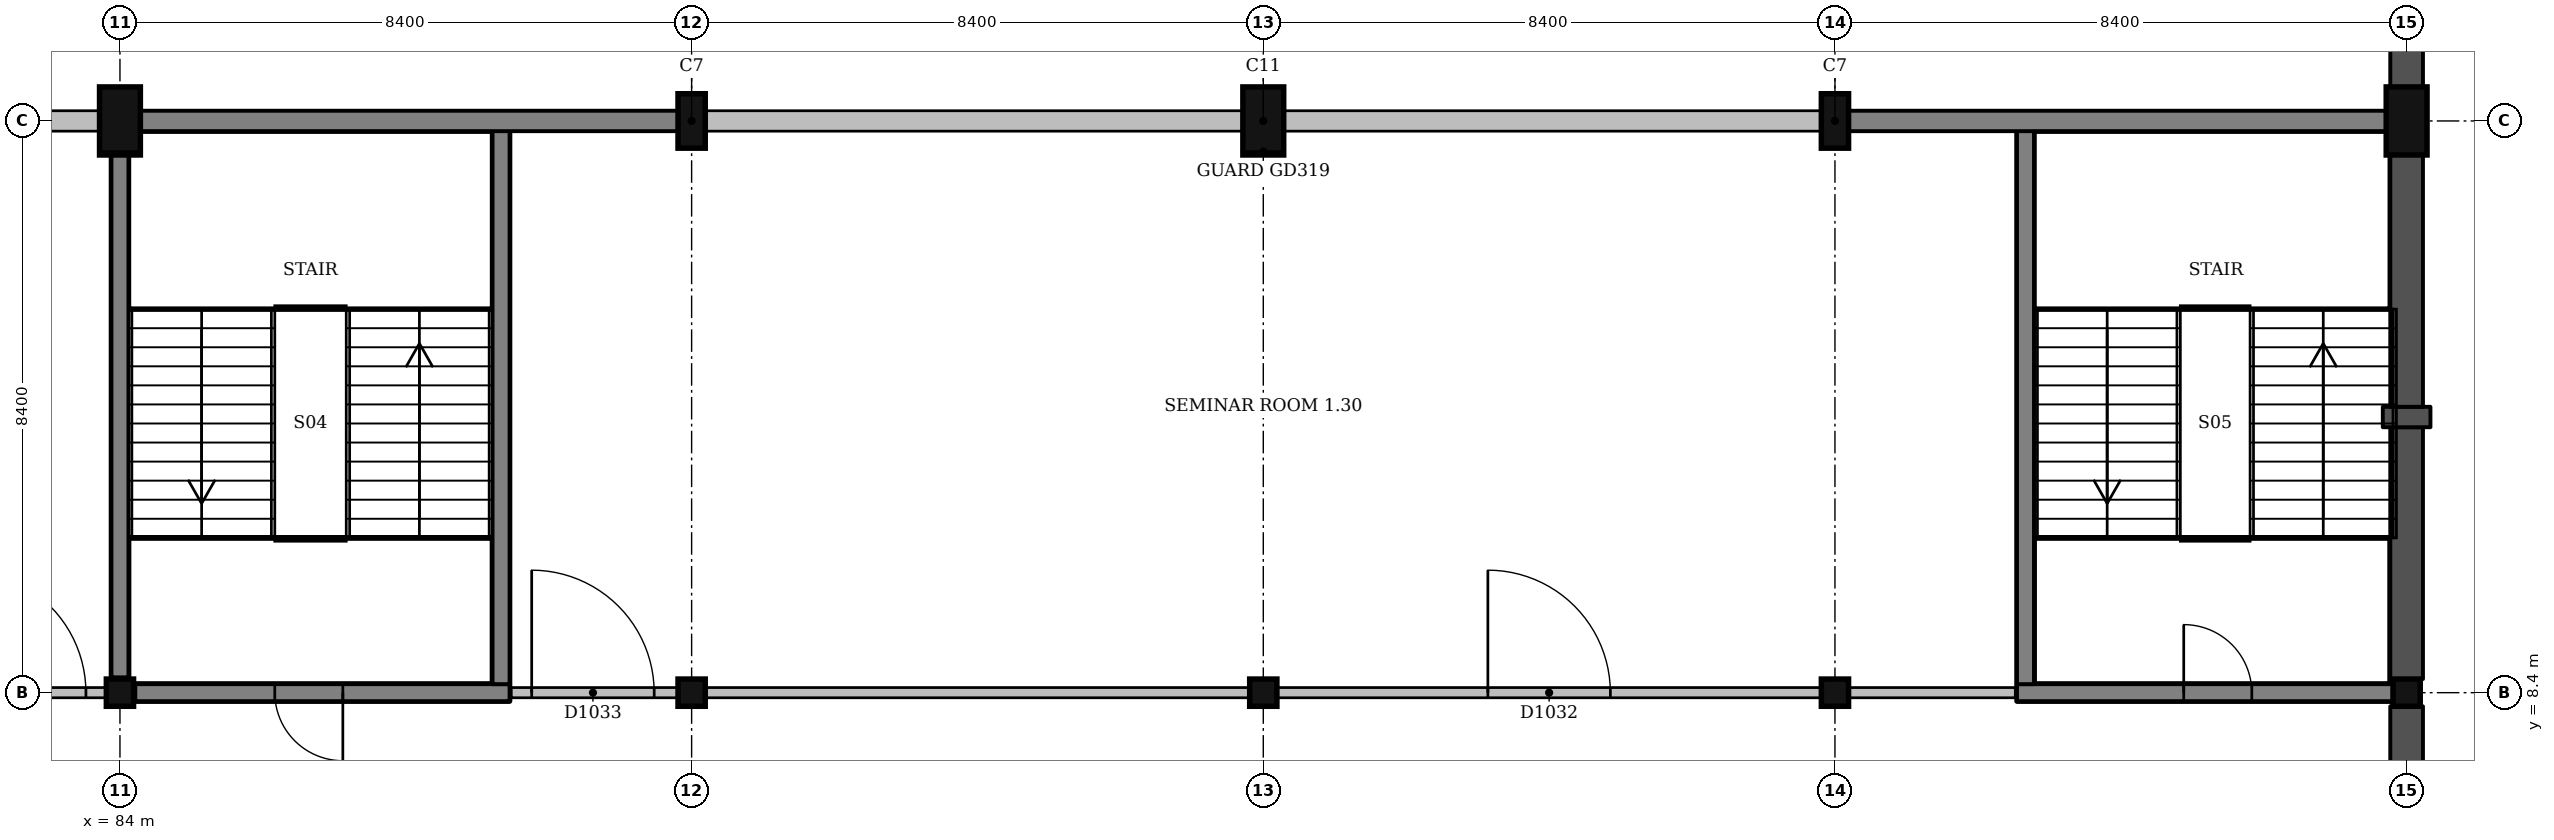
"""IFC4 building model, lengths in metres.
Left out: names, types, materials, properties, quantities, classifications, styles, units other than length and angle.
Written with IfcOpenShell. Run it as: python <this file> out.ifc"""

import sys

from ifc_helpers import new_model, si_unit, direction, frame, frame_2d, origin, origin_2d, place, context, subcontext, project, spatial, rectangle, extrude, element, fill, save


model = new_model("IFC4")
c1 = context("Model", 3, precision=1e-05, world=origin(), true_north=direction((0.0, 1.0)))
c2 = subcontext(c1, "Body", "Model", "MODEL_VIEW")
j1 = project(units=[si_unit("LENGTHUNIT", "METRE"), si_unit("PLANEANGLEUNIT", "RADIAN")], contexts=[c1])
p1 = place(None, origin())
s1 = spatial("IfcSite", under=j1, at=p1, CompositionType="ELEMENT")
p2 = place(p1, origin())
s2 = spatial("IfcBuilding", under=s1, at=p2, CompositionType="ELEMENT")
p3 = place(p2, frame((0.0, 0.0, 4.5)))
s3 = spatial("IfcBuildingStorey", under=s2, at=p3, CompositionType="ELEMENT", Elevation=4.5)
p4 = place(p3, frame((84.0, 8.4, 0.0), z_axis=(0.0, 0.0, 1.0), x_axis=(1.0, 0.0, 0.0)))
e1 = element("IfcColumn", 1, at=p4, inside=s3, PredefinedType="COLUMN", context=c2, shape_type="SweptSolid", body=[
    extrude(rectangle(XDim=0.4, YDim=0.4, at=origin_2d()), origin(), (0.0, 0.0, 1.0), 4.5),
])
p5 = place(p3, frame((84.0, 16.8, 0.0), z_axis=(0.0, 0.0, 1.0), x_axis=(1.0, 0.0, 0.0)))
e2 = element("IfcColumn", 2, at=p5, inside=s3, PredefinedType="COLUMN", context=c2, shape_type="SweptSolid", body=[
    extrude(rectangle(XDim=0.6, YDim=1.0, at=origin_2d()), origin(), (0.0, 0.0, 1.0), 4.5),
])
p6 = place(p3, frame((92.4, 8.4, 0.0), z_axis=(0.0, 0.0, 1.0), x_axis=(1.0, 0.0, 0.0)))
e3 = element("IfcColumn", 3, at=p6, inside=s3, PredefinedType="COLUMN", context=c2, shape_type="SweptSolid", body=[
    extrude(rectangle(XDim=0.4, YDim=0.4, at=origin_2d()), origin(), (0.0, 0.0, 1.0), 4.5),
])
p7 = place(p3, frame((92.4, 16.8, 0.0), z_axis=(0.0, 0.0, 1.0), x_axis=(1.0, 0.0, 0.0)))
e4 = element("IfcColumn", 4, at=p7, inside=s3, PredefinedType="COLUMN", context=c2, shape_type="SweptSolid", body=[
    extrude(rectangle(XDim=0.4, YDim=0.8, at=origin_2d()), origin(), (0.0, 0.0, 1.0), 4.5),
])
p8 = place(p3, frame((100.8, 8.4, 0.0), z_axis=(0.0, 0.0, 1.0), x_axis=(1.0, 0.0, 0.0)))
e5 = element("IfcColumn", 5, at=p8, inside=s3, PredefinedType="COLUMN", context=c2, shape_type="SweptSolid", body=[
    extrude(rectangle(XDim=0.4, YDim=0.4, at=origin_2d()), origin(), (0.0, 0.0, 1.0), 4.5),
])
p9 = place(p3, frame((100.8, 16.8, 0.0), z_axis=(0.0, 0.0, 1.0), x_axis=(1.0, 0.0, 0.0)))
e6 = element("IfcColumn", 6, at=p9, inside=s3, PredefinedType="COLUMN", context=c2, shape_type="SweptSolid", body=[
    extrude(rectangle(XDim=0.6, YDim=1.0, at=origin_2d()), origin(), (0.0, 0.0, 1.0), 4.5),
])
p10 = place(p3, frame((109.2, 8.4, 0.0), z_axis=(0.0, 0.0, 1.0), x_axis=(1.0, 0.0, 0.0)))
e7 = element("IfcColumn", 7, at=p10, inside=s3, PredefinedType="COLUMN", context=c2, shape_type="SweptSolid", body=[
    extrude(rectangle(XDim=0.4, YDim=0.4, at=origin_2d()), origin(), (0.0, 0.0, 1.0), 4.5),
])
p11 = place(p3, frame((109.2, 16.8, 0.0), z_axis=(0.0, 0.0, 1.0), x_axis=(1.0, 0.0, 0.0)))
e8 = element("IfcColumn", 8, at=p11, inside=s3, PredefinedType="COLUMN", context=c2, shape_type="SweptSolid", body=[
    extrude(rectangle(XDim=0.4, YDim=0.8, at=origin_2d()), origin(), (0.0, 0.0, 1.0), 4.5),
])
p12 = place(p3, frame((117.6, 8.4, 0.0), z_axis=(0.0, 0.0, 1.0), x_axis=(1.0, 0.0, 0.0)))
e9 = element("IfcColumn", 9, at=p12, inside=s3, PredefinedType="COLUMN", context=c2, shape_type="SweptSolid", body=[
    extrude(rectangle(XDim=0.4, YDim=0.4, at=origin_2d()), origin(), (0.0, 0.0, 1.0), 4.5),
])
p13 = place(p3, frame((117.6, 16.8, 0.0), z_axis=(0.0, 0.0, 1.0), x_axis=(1.0, 0.0, 0.0)))
e10 = element("IfcColumn", 10, at=p13, inside=s3, PredefinedType="COLUMN", context=c2, shape_type="SweptSolid", body=[
    extrude(rectangle(XDim=0.6, YDim=1.0, at=origin_2d()), origin(), (0.0, 0.0, 1.0), 4.5),
])
p14 = place(p3, frame((111.875, 8.4, 0.0), z_axis=(0.0, 0.0, 1.0), x_axis=(1.0, 0.0, 0.0)))
e11 = element("IfcWall", 11, at=p14, inside=s3, PredefinedType="SHEAR", context=c2, shape_type="SweptSolid", body=[
    extrude(rectangle(XDim=5.525, YDim=0.25, at=frame_2d((2.762, 0.0))), origin(), (0.0, 0.0, 1.0), 4.5),
])
p15 = place(p14, frame((2.45, 0.0, 0.0)))
e12 = element("IfcOpeningElement", 12, at=p15, cuts=e11, PredefinedType="OPENING", context=c2, shape_type="SweptSolid", body=[
    extrude(rectangle(XDim=1.0, YDim=2.1, at=frame_2d((0.5, 1.05))), frame((0.0, 0.135, 0.0), z_axis=(0.0, -1.0, 0.0), x_axis=(1.0, 0.0, 0.0)), (0.0, 0.0, 1.0), 0.27),
])
p16 = place(p3, frame((112.0, 8.525, 0.0), z_axis=(0.0, 0.0, 1.0), x_axis=(0.0, 1.0, 0.0)))
e13 = element("IfcWall", 13, at=p16, inside=s3, PredefinedType="SHEAR", context=c2, shape_type="SweptSolid", body=[
    extrude(rectangle(XDim=8.15, YDim=0.25, at=frame_2d((4.075, 0.0))), origin(), (0.0, 0.0, 1.0), 4.5),
])
p17 = place(p3, frame((84.225, 8.4, 0.0), z_axis=(0.0, 0.0, 1.0), x_axis=(1.0, 0.0, 0.0)))
e14 = element("IfcWall", 14, at=p17, inside=s3, PredefinedType="SHEAR", context=c2, shape_type="SweptSolid", body=[
    extrude(rectangle(XDim=5.5, YDim=0.25, at=frame_2d((2.75, 0.0))), origin(), (0.0, 0.0, 1.0), 4.5),
])
p18 = place(p17, frame((2.05, 0.0, 0.0)))
e15 = element("IfcOpeningElement", 15, at=p18, cuts=e14, PredefinedType="OPENING", context=c2, shape_type="SweptSolid", body=[
    extrude(rectangle(XDim=1.0, YDim=2.1, at=frame_2d((0.5, 1.05))), frame((0.0, 0.135, 0.0), z_axis=(0.0, -1.0, 0.0), x_axis=(1.0, 0.0, 0.0)), (0.0, 0.0, 1.0), 0.27),
])
p19 = place(p3, frame((84.0, 8.625, 0.0), z_axis=(0.0, 0.0, 1.0), x_axis=(0.0, 1.0, 0.0)))
e16 = element("IfcWall", 16, at=p19, inside=s3, PredefinedType="SHEAR", context=c2, shape_type="SweptSolid", body=[
    extrude(rectangle(XDim=7.675, YDim=0.25, at=frame_2d((3.837, 0.0))), origin(), (0.0, 0.0, 1.0), 4.5),
])
p20 = place(p3, frame((89.6, 8.525, 0.0), z_axis=(0.0, 0.0, 1.0), x_axis=(0.0, 1.0, 0.0)))
e17 = element("IfcWall", 17, at=p20, inside=s3, PredefinedType="SHEAR", context=c2, shape_type="SweptSolid", body=[
    extrude(rectangle(XDim=8.15, YDim=0.25, at=frame_2d((4.075, 0.0))), origin(), (0.0, 0.0, 1.0), 4.5),
])
p21 = place(p3, frame((117.6, 4.35, 0.0), z_axis=(0.0, 0.0, 1.0), x_axis=(0.0, 1.0, 0.0)))
e18 = element("IfcWall", 18, at=p21, inside=s3, PredefinedType="SOLIDWALL", context=c2, shape_type="SweptSolid", body=[
    extrude(rectangle(XDim=3.85, YDim=0.48, at=frame_2d((1.925, 0.0))), origin(), (0.0, 0.0, 1.0), 3.45),
])
p22 = place(p3, frame((117.6, 8.6, 0.0), z_axis=(0.0, 0.0, 1.0), x_axis=(0.0, 1.0, 0.0)))
e19 = element("IfcWall", 19, at=p22, inside=s3, PredefinedType="SOLIDWALL", context=c2, shape_type="SweptSolid", body=[
    extrude(rectangle(XDim=3.7, YDim=0.48, at=frame_2d((1.85, 0.0))), origin(), (0.0, 0.0, 1.0), 3.75),
])
p23 = place(p3, frame((117.6, 12.3, 0.0), z_axis=(0.0, 0.0, 1.0), x_axis=(0.0, 1.0, 0.0)))
e20 = element("IfcWall", 20, at=p23, inside=s3, PredefinedType="SOLIDWALL", context=c2, shape_type="SweptSolid", body=[
    extrude(rectangle(XDim=0.3, YDim=0.7, at=frame_2d((0.15, 0.0))), origin(), (0.0, 0.0, 1.0), 3.75),
])
p24 = place(p3, frame((117.6, 12.6, 0.0), z_axis=(0.0, 0.0, 1.0), x_axis=(0.0, 1.0, 0.0)))
e21 = element("IfcWall", 21, at=p24, inside=s3, PredefinedType="SOLIDWALL", context=c2, shape_type="SweptSolid", body=[
    extrude(rectangle(XDim=3.7, YDim=0.48, at=frame_2d((1.85, 0.0))), origin(), (0.0, 0.0, 1.0), 3.75),
])
p25 = place(p3, frame((117.3, 16.8, 0.0), z_axis=(0.0, 0.0, 1.0), x_axis=(-1.0, 0.0, 0.0)))
e22 = element("IfcWall", 22, at=p25, inside=s3, PredefinedType="SOLIDWALL", context=c2, shape_type="SweptSolid", body=[
    extrude(rectangle(XDim=7.9, YDim=0.3, at=frame_2d((3.95, 0.0))), origin(), (0.0, 0.0, 1.0), 3.45),
])
for number, where, z_axis, x_axis in (
    (23, (109.0, 16.8, 0.0), (0.0, 0.0, 1.0), (-1.0, 0.0, 0.0)),
    (24, (100.5, 16.8, 0.0), (0.0, 0.0, 1.0), (-1.0, 0.0, 0.0)),
    (25, (92.2, 16.8, 0.0), (0.0, 0.0, 1.0), (-1.0, 0.0, 0.0)),
    (26, (83.7, 16.8, 0.0), (0.0, 0.0, 1.0), (-1.0, 0.0, 0.0)),
):
    element("IfcWall", number, at=place(p3, frame(where, z_axis=z_axis, x_axis=x_axis)), inside=s3, PredefinedType="SOLIDWALL", context=c2, shape_type="SweptSolid", body=[
        extrude(rectangle(XDim=7.9, YDim=0.3, at=frame_2d((3.95, 0.0))), origin(), (0.0, 0.0, 1.0), 3.45),
    ])
p26 = place(p3, frame((117.6, 17.3, 0.0), z_axis=(0.0, 0.0, 1.0), x_axis=(0.0, 1.0, 0.0)))
e27 = element("IfcWall", 27, at=p26, inside=s3, PredefinedType="SOLIDWALL", context=c2, shape_type="SweptSolid", body=[
    extrude(rectangle(XDim=3.675, YDim=0.48, at=frame_2d((1.837, 0.0))), origin(), (0.0, 0.0, 1.0), 2.489),
])
p27 = place(p3, frame((89.75, 8.4, 0.0), z_axis=(0.0, 0.0, 1.0), x_axis=(1.0, 0.0, 0.0)))
e28 = element("IfcWall", 28, at=p27, inside=s3, PredefinedType="PARTITIONING", context=c2, shape_type="SweptSolid", body=[
    extrude(rectangle(XDim=2.45, YDim=0.15, at=frame_2d((1.225, 0.0))), origin(), (0.0, 0.0, 1.0), 3.6),
])
p28 = place(p27, frame((0.3, 0.0, 0.0)))
e29 = element("IfcOpeningElement", 29, at=p28, cuts=e28, PredefinedType="OPENING", context=c2, shape_type="SweptSolid", body=[
    extrude(rectangle(XDim=1.8, YDim=2.1, at=frame_2d((0.9, 1.05))), frame((0.0, 0.085, 0.0), z_axis=(0.0, -1.0, 0.0), x_axis=(1.0, 0.0, 0.0)), (0.0, 0.0, 1.0), 0.17),
])
p29 = place(p3, frame((92.6, 8.4, 0.0), z_axis=(0.0, 0.0, 1.0), x_axis=(1.0, 0.0, 0.0)))
e30 = element("IfcWall", 30, at=p29, inside=s3, PredefinedType="PARTITIONING", context=c2, shape_type="SweptSolid", body=[
    extrude(rectangle(XDim=8.0, YDim=0.15, at=frame_2d((4.0, 0.0))), origin(), (0.0, 0.0, 1.0), 3.5),
])
p30 = place(p3, frame((101.0, 8.4, 0.0), z_axis=(0.0, 0.0, 1.0), x_axis=(1.0, 0.0, 0.0)))
e31 = element("IfcWall", 31, at=p30, inside=s3, PredefinedType="PARTITIONING", context=c2, shape_type="SweptSolid", body=[
    extrude(rectangle(XDim=8.0, YDim=0.15, at=frame_2d((4.0, 0.0))), origin(), (0.0, 0.0, 1.0), 3.5),
])
p31 = place(p30, frame((3.1, 0.0, 0.0)))
e32 = element("IfcOpeningElement", 32, at=p31, cuts=e31, PredefinedType="OPENING", context=c2, shape_type="SweptSolid", body=[
    extrude(rectangle(XDim=1.8, YDim=2.1, at=frame_2d((0.9, 1.05))), frame((0.0, 0.085, 0.0), z_axis=(0.0, -1.0, 0.0), x_axis=(1.0, 0.0, 0.0)), (0.0, 0.0, 1.0), 0.17),
])
p32 = place(p3, frame((109.4, 8.4, 0.0), z_axis=(0.0, 0.0, 1.0), x_axis=(1.0, 0.0, 0.0)))
e33 = element("IfcWall", 33, at=p32, inside=s3, PredefinedType="PARTITIONING", context=c2, shape_type="SweptSolid", body=[
    extrude(rectangle(XDim=2.45, YDim=0.15, at=frame_2d((1.225, 0.0))), origin(), (0.0, 0.0, 1.0), 3.6),
])
p33 = place(p3, frame((75.8, 8.4, 0.0), z_axis=(0.0, 0.0, 1.0), x_axis=(1.0, 0.0, 0.0)))
e34 = element("IfcWall", 34, at=p33, inside=s3, PredefinedType="PARTITIONING", context=c2, shape_type="SweptSolid", body=[
    extrude(rectangle(XDim=8.0, YDim=0.15, at=frame_2d((4.0, 0.0))), origin(), (0.0, 0.0, 1.0), 3.5),
])
p34 = place(p33, frame((5.9, 0.0, 0.0)))
e35 = element("IfcOpeningElement", 35, at=p34, cuts=e34, PredefinedType="OPENING", context=c2, shape_type="SweptSolid", body=[
    extrude(rectangle(XDim=1.8, YDim=2.1, at=frame_2d((0.9, 1.05))), frame((0.0, 0.085, 0.0), z_axis=(0.0, -1.0, 0.0), x_axis=(1.0, 0.0, 0.0)), (0.0, 0.0, 1.0), 0.17),
])
p35 = place(p34, origin())
e36 = element("IfcDoor", 36, at=p35, inside=s3, OperationType="DOUBLE_DOOR_SINGLE_SWING", PredefinedType="DOOR", context=c2, shape_type="SweptSolid", body=[
    extrude(rectangle(XDim=1.8, YDim=2.1, at=frame_2d((0.9, 1.05))), frame((0.0, 0.025, 0.0), z_axis=(0.0, -1.0, 0.0), x_axis=(1.0, 0.0, 0.0)), (0.0, 0.0, 1.0), 0.05),
])
fill(e35, e36)
p36 = place(p31, origin())
e37 = element("IfcDoor", 37, at=p36, inside=s3, OperationType="DOUBLE_DOOR_SINGLE_SWING", PredefinedType="DOOR", context=c2, shape_type="SweptSolid", body=[
    extrude(rectangle(XDim=1.8, YDim=2.1, at=frame_2d((0.9, 1.05))), frame((0.0, 0.025, 0.0), z_axis=(0.0, -1.0, 0.0), x_axis=(1.0, 0.0, 0.0)), (0.0, 0.0, 1.0), 0.05),
])
fill(e32, e37)
p37 = place(p28, origin())
e38 = element("IfcDoor", 38, at=p37, inside=s3, OperationType="DOUBLE_DOOR_SINGLE_SWING", PredefinedType="DOOR", context=c2, shape_type="SweptSolid", body=[
    extrude(rectangle(XDim=1.8, YDim=2.1, at=frame_2d((0.9, 1.05))), frame((0.0, 0.025, 0.0), z_axis=(0.0, -1.0, 0.0), x_axis=(1.0, 0.0, 0.0)), (0.0, 0.0, 1.0), 0.05),
])
fill(e29, e38)
p38 = place(p18, origin())
e39 = element("IfcDoor", 39, at=p38, inside=s3, OperationType="SINGLE_SWING_RIGHT", PredefinedType="DOOR", context=c2, shape_type="SweptSolid", body=[
    extrude(rectangle(XDim=1.0, YDim=2.1, at=frame_2d((0.5, 1.05))), frame((0.0, 0.025, 0.0), z_axis=(0.0, -1.0, 0.0), x_axis=(1.0, 0.0, 0.0)), (0.0, 0.0, 1.0), 0.05),
])
fill(e15, e39)
p39 = place(p15, origin())
e40 = element("IfcDoor", 40, at=p39, inside=s3, OperationType="SINGLE_SWING_LEFT", PredefinedType="DOOR", context=c2, shape_type="SweptSolid", body=[
    extrude(rectangle(XDim=1.0, YDim=2.1, at=frame_2d((0.5, 1.05))), frame((0.0, 0.025, 0.0), z_axis=(0.0, -1.0, 0.0), x_axis=(1.0, 0.0, 0.0)), (0.0, 0.0, 1.0), 0.05),
])
fill(e12, e40)
save(model, sys.argv[1])
